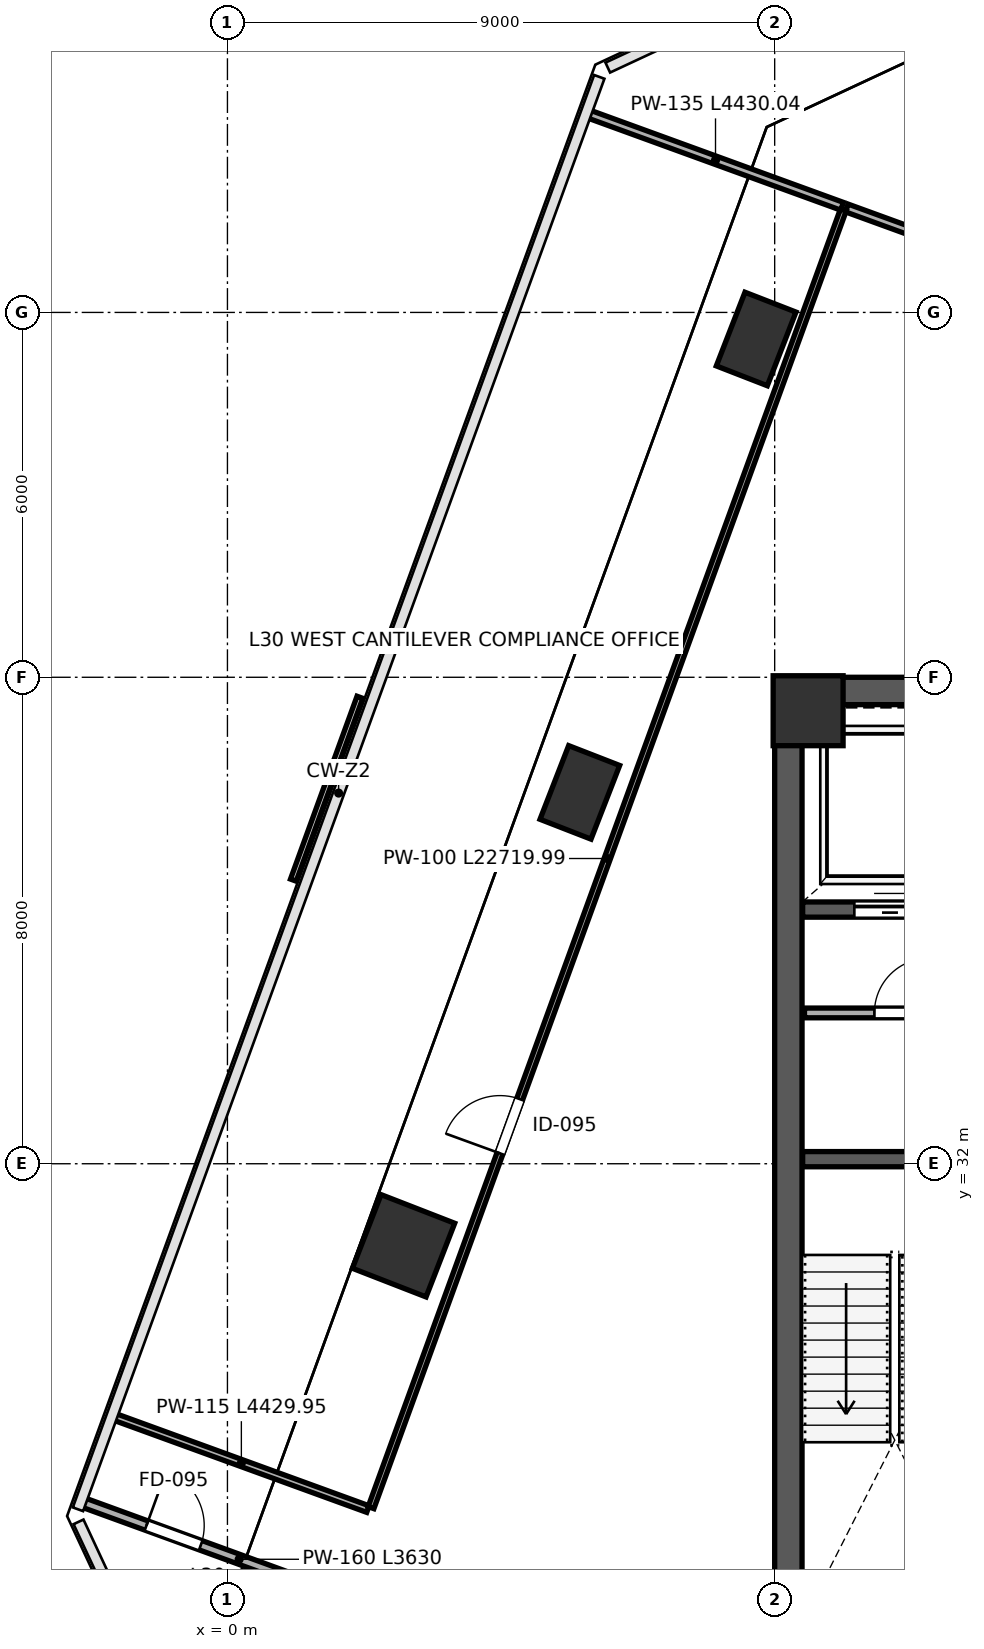
"""IFC4 building model, lengths in metres.
Left out: names, types, materials, properties, quantities, classifications, styles, units other than length and angle.
Written with IfcOpenShell. Run it as: python <this file> out.ifc"""

import sys

from ifc_helpers import new_model, si_unit, direction, frame, frame_2d, origin, origin_2d, place, context, subcontext, project, spatial, rectangle, extrude, clip, halfspace, source, transform, mapped, element, fill, save


model = new_model("IFC4")
c1 = context("Model", 3, precision=1e-05, world=origin(), true_north=direction((0.0, 1.0)))
c2 = subcontext(c1, "Body", "Model", "MODEL_VIEW")
j1 = project(units=[si_unit("LENGTHUNIT", "METRE"), si_unit("PLANEANGLEUNIT", "RADIAN")], contexts=[c1])
p1 = place(None, origin())
s1 = spatial("IfcSite", under=j1, at=p1, CompositionType="ELEMENT")
p2 = place(p1, origin())
s2 = spatial("IfcBuilding", under=s1, at=p2, CompositionType="ELEMENT")
p3 = place(p2, frame((0.0, 0.0, 137.2)))
s3 = spatial("IfcBuildingStorey", under=s2, at=p3, CompositionType="ELEMENT", Elevation=137.2)
m1 = source(origin(), c2, "Body", "SweptSolid", [
    extrude(rectangle(XDim=1.15, YDim=1.15, at=origin_2d()), origin(), (0.0, 0.0, 1.0), 4.198),
])
p4 = place(p3, frame((9.55, 39.45, 0.001), z_axis=(0.0, 0.0, 1.0), x_axis=(1.0, 0.0, 0.0)))
e1 = element("IfcColumn", 1, at=p4, inside=s3, PredefinedType="COLUMN", context=c2, shape_type="MappedRepresentation", body=[
    mapped(m1, transform((0.0, 0.0, 0.0), scale=1.0)),
])
p5 = place(p3, frame((2.896, 30.651, 0.0), z_axis=(-0.005959407752, 0.096276257272, 0.995336811208), x_axis=(0.9525147874, -0.302478612303, 0.034960962273)))
e2 = element("IfcColumn", 2, at=p5, inside=s3, PredefinedType="COLUMN", context=c2, shape_type="Clipping", body=[
    clip(clip(extrude(rectangle(XDim=1.3, YDim=1.3, at=origin_2d()), origin(), (0.0, 0.0, 1.0), 4.22), halfspace(frame((0.0, 0.0, 0.082), z_axis=(0.0, 0.0, -1.0), x_axis=(1.0, 0.0, 0.0)), False)), halfspace(frame((0.0, 0.0, 4.137), z_axis=(0.0, 0.0, 1.0), x_axis=(1.0, 0.0, 0.0)), False)),
])
p6 = place(p3, frame((5.796, 38.107, 0.0), z_axis=(0.032486438012, 0.08089760054, 0.996192857619), x_axis=(0.73032874393, -0.682364717141, 0.031596179998)))
e3 = element("IfcColumn", 3, at=p6, inside=s3, PredefinedType="PILASTER", context=c2, shape_type="Clipping", body=[
    clip(clip(extrude(rectangle(XDim=0.9, YDim=1.3, at=origin_2d()), origin(), (0.0, 0.0, 1.0), 4.216), halfspace(frame((0.0, 0.0, 0.068), z_axis=(0.0, 0.0, -1.0), x_axis=(1.0, 0.0, 0.0)), False)), halfspace(frame((0.0, 0.0, 4.148), z_axis=(0.0, 0.0, 1.0), x_axis=(1.0, 0.0, 0.0)), False)),
])
p7 = place(p3, frame((8.695, 45.563, 0.0), z_axis=(0.070818581829, 0.065495616528, 0.995336652939), x_axis=(0.367965840543, -0.929181806711, 0.034961554169)))
e4 = element("IfcColumn", 4, at=p7, inside=s3, PredefinedType="PILASTER", context=c2, shape_type="Clipping", body=[
    clip(clip(extrude(rectangle(XDim=0.9, YDim=1.3, at=origin_2d()), origin(), (0.0, 0.0, 1.0), 4.22), halfspace(frame((0.0, 0.0, 0.075), z_axis=(0.0, 0.0, -1.0), x_axis=(1.0, 0.0, 0.0)), False)), halfspace(frame((0.0, 0.0, 4.145), z_axis=(0.0, 0.0, 1.0), x_axis=(1.0, 0.0, 0.0)), False)),
])
p8 = place(p3, frame((9.225, 24.45, 0.0), z_axis=(0.0, 0.0, 1.0), x_axis=(0.0, 1.0, 0.0)))
e5 = element("IfcWall", 5, at=p8, inside=s3, PredefinedType="SHEAR", context=c2, shape_type="SweptSolid", body=[
    extrude(rectangle(XDim=15.1, YDim=0.45, at=frame_2d((7.55, 0.0))), origin(), (0.0, 0.0, 1.0), 3.96),
])
p9 = place(p3, frame((9.0, 39.775, 0.0), z_axis=(0.0, 0.0, 1.0), x_axis=(1.0, 0.0, 0.0)))
e6 = element("IfcWall", 6, at=p9, inside=s3, PredefinedType="SHEAR", context=c2, shape_type="SweptSolid", body=[
    extrude(rectangle(XDim=18.0, YDim=0.45, at=frame_2d((9.0, 0.0))), origin(), (0.0, 0.0, 1.0), 3.96),
])
p10 = place(p3, frame((9.46, 32.075, 0.0), z_axis=(0.0, 0.0, 1.0), x_axis=(1.0, 0.0, 0.0)))
e7 = element("IfcWall", 7, at=p10, inside=s3, PredefinedType="SHEAR", context=c2, shape_type="SweptSolid", body=[
    extrude(rectangle(XDim=3.29, YDim=0.25, at=frame_2d((1.645, 0.0))), origin(), (0.0, 0.0, 1.0), 3.96),
])
p11 = place(p3, frame((9.46, 36.18, 0.0), z_axis=(0.0, 0.0, 1.0), x_axis=(1.0, 0.0, 0.0)))
e8 = element("IfcWall", 8, at=p11, inside=s3, PredefinedType="SHEAR", context=c2, shape_type="SweptSolid", body=[
    extrude(rectangle(XDim=3.79, YDim=0.25, at=frame_2d((1.895, 0.0))), origin(), (0.0, 0.0, 1.0), 3.96),
])
p12 = place(p11, frame((2.62, 0.0, 0.0)))
e9 = element("IfcOpeningElement", 9, at=p12, cuts=e8, PredefinedType="OPENING", context=c2, shape_type="SweptSolid", body=[
    extrude(rectangle(XDim=0.85, YDim=2.1, at=frame_2d((0.425, 1.05))), frame((0.0, 0.135, 0.0), z_axis=(0.0, -1.0, 0.0), x_axis=(1.0, 0.0, 0.0)), (0.0, 0.0, 1.0), 0.27),
])
p13 = place(p11, frame((0.85, 0.0, 0.0)))
e10 = element("IfcOpeningElement", 10, at=p13, cuts=e8, PredefinedType="OPENING", context=c2, shape_type="SweptSolid", body=[
    extrude(rectangle(XDim=1.3, YDim=2.25, at=frame_2d((0.65, 1.125))), frame((0.0, 0.135, 0.0), z_axis=(0.0, -1.0, 0.0), x_axis=(1.0, 0.0, 0.0)), (0.0, 0.0, 1.0), 0.27),
])
p14 = place(p3, frame((9.49, 34.48, 0.0), z_axis=(0.0, 0.0, 1.0), x_axis=(1.0, 0.0, 0.0)))
e11 = element("IfcWall", 11, at=p14, inside=s3, PredefinedType="PARTITIONING", context=c2, shape_type="SweptSolid", body=[
    extrude(rectangle(XDim=3.7, YDim=0.16, at=frame_2d((1.85, 0.0))), origin(), (0.0, 0.0, 1.0), 3.96),
])
p15 = place(p14, frame((1.15, 0.0, 0.0)))
e12 = element("IfcOpeningElement", 12, at=p15, cuts=e11, PredefinedType="OPENING", context=c2, shape_type="SweptSolid", body=[
    extrude(rectangle(XDim=0.9, YDim=2.15, at=frame_2d((0.45, 1.075))), frame((0.0, 0.09, 0.0), z_axis=(0.0, -1.0, 0.0), x_axis=(1.0, 0.0, 0.0)), (0.0, 0.0, 1.0), 0.18),
])
p16 = place(p3, frame((-2.365, 26.427, 0.0), z_axis=(0.0, 0.0, 1.0), x_axis=(0.939671610829, -0.342077862192, 0.0)))
e13 = element("IfcWall", 13, at=p16, inside=s3, PredefinedType="PARTITIONING", context=c2, shape_type="SweptSolid", body=[
    extrude(rectangle(XDim=3.63, YDim=0.16, at=frame_2d((1.815, 0.0))), origin(), (0.0, 0.0, 1.0), 3.96),
])
p17 = place(p16, frame((1.1, 0.0, 0.0)))
e14 = element("IfcOpeningElement", 14, at=p17, cuts=e13, PredefinedType="OPENING", context=c2, shape_type="SweptSolid", body=[
    extrude(rectangle(XDim=0.95, YDim=2.15, at=frame_2d((0.475, 1.075))), frame((0.0, 0.09, 0.0), z_axis=(0.0, -1.0, 0.0), x_axis=(1.0, 0.0, 0.0)), (0.0, 0.0, 1.0), 0.18),
])
p18 = place(p3, frame((10.184, 47.719, 0.0), z_axis=(0.0, 0.0, 1.0), x_axis=(0.939691432235, -0.342023408826, 0.0)))
e15 = element("IfcWall", 15, at=p18, inside=s3, PredefinedType="PARTITIONING", context=c2, shape_type="SweptSolid", body=[
    extrude(rectangle(XDim=25.87, YDim=0.135, at=frame_2d((12.935, 0.0))), origin(), (0.0, 0.0, 1.0), 3.96),
])
p19 = place(p18, frame((18.8, 0.0, 0.0)))
e16 = element("IfcOpeningElement", 16, at=p19, cuts=e15, PredefinedType="OPENING", context=c2, shape_type="SweptSolid", body=[
    extrude(rectangle(XDim=0.95, YDim=2.15, at=frame_2d((0.475, 1.075))), frame((0.0, 0.078, 0.0), z_axis=(0.0, -1.0, 0.0), x_axis=(1.0, 0.0, 0.0)), (0.0, 0.0, 1.0), 0.155),
])
p20 = place(p3, frame((-1.853, 27.836, 0.0), z_axis=(0.0, 0.0, 1.0), x_axis=(0.939693620895, -0.342017395535, 0.0)))
e17 = element("IfcWall", 17, at=p20, inside=s3, PredefinedType="PARTITIONING", context=c2, shape_type="SweptSolid", body=[
    extrude(rectangle(XDim=4.43, YDim=0.115, at=frame_2d((2.215, 0.0))), origin(), (0.0, 0.0, 1.0), 3.96),
])
p21 = place(p3, frame((2.362, 26.345, 0.0), z_axis=(0.0, 0.0, 1.0), x_axis=(0.342021727767, 0.939692044095, 0.0)))
e18 = element("IfcWall", 18, at=p21, inside=s3, PredefinedType="PARTITIONING", context=c2, shape_type="SweptSolid", body=[
    extrude(rectangle(XDim=22.72, YDim=0.1, at=frame_2d((11.36, 0.0))), origin(), (0.0, 0.0, 1.0), 3.96),
])
p22 = place(p21, frame((6.2, 0.0, 0.0)))
e19 = element("IfcOpeningElement", 19, at=p22, cuts=e18, PredefinedType="OPENING", context=c2, shape_type="SweptSolid", body=[
    extrude(rectangle(XDim=0.95, YDim=2.15, at=frame_2d((0.475, 1.075))), frame((0.0, 0.06, 0.0), z_axis=(0.0, -1.0, 0.0), x_axis=(1.0, 0.0, 0.0)), (0.0, 0.0, 1.0), 0.12),
])
p23 = place(p3, frame((5.946, 49.261, 0.0), z_axis=(0.0, 0.0, 1.0), x_axis=(0.939693620895, -0.342017395535, 0.0)))
e20 = element("IfcWall", 20, at=p23, inside=s3, PredefinedType="PARTITIONING", context=c2, shape_type="SweptSolid", body=[
    extrude(rectangle(XDim=4.43, YDim=0.135, at=frame_2d((2.215, 0.0))), origin(), (0.0, 0.0, 1.0), 3.96),
])
m2 = source(origin(), c2, "Body", "SweptSolid", [
    extrude(rectangle(XDim=1.3, YDim=2.25, at=frame_2d((0.65, 1.125))), frame((0.0, 0.025, 0.0), z_axis=(0.0, -1.0, 0.0), x_axis=(1.0, 0.0, 0.0)), (0.0, 0.0, 1.0), 0.05),
])
p24 = place(p13, origin())
e21 = element("IfcDoor", 21, at=p24, inside=s3, OperationType="SLIDING_TO_LEFT", PredefinedType="DOOR", context=c2, shape_type="MappedRepresentation", body=[
    mapped(m2, transform((0.0, 0.0, 0.0), scale=1.0)),
])
fill(e10, e21)
m3 = source(origin(), c2, "Body", "SweptSolid", [
    extrude(rectangle(XDim=0.9, YDim=2.15, at=frame_2d((0.45, 1.075))), frame((0.0, 0.025, 0.0), z_axis=(0.0, -1.0, 0.0), x_axis=(1.0, 0.0, 0.0)), (0.0, 0.0, 1.0), 0.05),
])
p25 = place(p15, origin())
e22 = element("IfcDoor", 22, at=p25, inside=s3, OperationType="SINGLE_SWING_RIGHT", PredefinedType="DOOR", context=c2, shape_type="MappedRepresentation", body=[
    mapped(m3, transform((0.0, 0.0, 0.0), scale=1.0)),
])
fill(e12, e22)
m4 = source(origin(), c2, "Body", "SweptSolid", [
    extrude(rectangle(XDim=0.95, YDim=2.15, at=frame_2d((0.475, 1.075))), frame((0.0, 0.025, 0.0), z_axis=(0.0, -1.0, 0.0), x_axis=(1.0, 0.0, 0.0)), (0.0, 0.0, 1.0), 0.05),
])
p26 = place(p17, origin())
e23 = element("IfcDoor", 23, at=p26, inside=s3, OperationType="SINGLE_SWING_LEFT", PredefinedType="DOOR", context=c2, shape_type="MappedRepresentation", body=[
    mapped(m4, transform((0.0, 0.0, 0.0), scale=1.0)),
])
fill(e14, e23)
m5 = source(origin(), c2, "Body", "SweptSolid", [
    extrude(rectangle(XDim=0.95, YDim=2.15, at=frame_2d((0.475, 1.075))), frame((0.0, 0.025, 0.0), z_axis=(0.0, -1.0, 0.0), x_axis=(1.0, 0.0, 0.0)), (0.0, 0.0, 1.0), 0.05),
])
p27 = place(p22, origin())
e24 = element("IfcDoor", 24, at=p27, inside=s3, OperationType="SINGLE_SWING_LEFT", PredefinedType="DOOR", context=c2, shape_type="MappedRepresentation", body=[
    mapped(m5, transform((0.0, 0.0, 0.0), scale=1.0)),
])
fill(e19, e24)
save(model, sys.argv[1])
